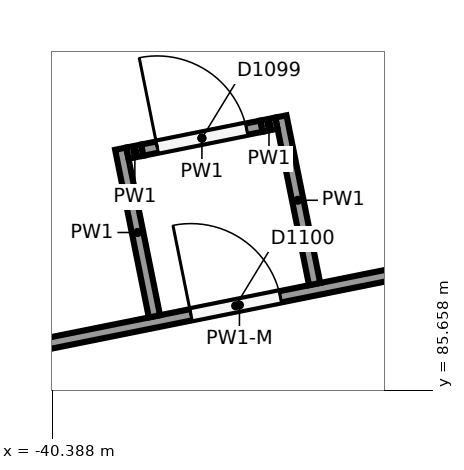
"""IFC4 building model, lengths in metres.
Left out: names, types, materials, properties, quantities, classifications, styles, units other than length and angle.
Written with IfcOpenShell. Run it as: python <this file> out.ifc"""

import sys

from ifc_helpers import new_model, si_unit, direction, frame, frame_2d, origin, place, context, subcontext, project, spatial, rectangle, extrude, element, fill, save


model = new_model("IFC4")
c1 = context("Model", 3, precision=1e-05, world=origin(), true_north=direction((0.0, 1.0)))
c2 = subcontext(c1, "Body", "Model", "MODEL_VIEW")
j1 = project(units=[si_unit("LENGTHUNIT", "METRE"), si_unit("PLANEANGLEUNIT", "RADIAN")], contexts=[c1])
p1 = place(None, origin())
s1 = spatial("IfcSite", under=j1, at=p1, CompositionType="ELEMENT")
p2 = place(p1, origin())
s2 = spatial("IfcBuilding", under=s1, at=p2, CompositionType="ELEMENT")
p3 = place(p2, frame((0.0, 0.0, 12.0)))
s3 = spatial("IfcBuildingStorey", under=s2, at=p3, CompositionType="ELEMENT", Elevation=12.0)
p4 = place(p3, frame((-42.189, 85.923, 0.0), z_axis=(0.0, 0.0, 1.0), x_axis=(0.980362096197, 0.197205883129, 0.0)))
e1 = element("IfcWall", 1, at=p4, inside=s3, PredefinedType="PARTITIONING", context=c2, shape_type="SweptSolid", body=[
    extrude(rectangle(XDim=8.702, YDim=0.15, at=frame_2d((4.351, 0.0))), origin(), (0.0, 0.0, 1.0), 3.655),
])
p5 = place(p4, frame((3.7, 0.0, 0.0)))
e2 = element("IfcOpeningElement", 2, at=p5, cuts=e1, PredefinedType="OPENING", context=c2, shape_type="SweptSolid", body=[
    extrude(rectangle(XDim=1.2, YDim=2.1, at=frame_2d((0.6, 1.05))), frame((0.0, 0.085, 0.0), z_axis=(0.0, -1.0, 0.0), x_axis=(1.0, 0.0, 0.0)), (0.0, 0.0, 1.0), 0.17),
])
for number, where, z_axis, x_axis in (
    (3, (-39.042, 86.633, 0.0), (0.0, 0.0, 1.0), (-0.197, 0.98, 0.0)),
    (4, (-36.934, 87.056, 0.0), (0.0, 0.0, 1.0), (-0.197, 0.98, 0.0)),
):
    element("IfcWall", number, at=place(p3, frame(where, z_axis=z_axis, x_axis=x_axis)), inside=s3, PredefinedType="PARTITIONING", context=c2, shape_type="SweptSolid", body=[
        extrude(rectangle(XDim=2.25, YDim=0.15, at=frame_2d((1.125, 0.0))), origin(), (0.0, 0.0, 1.0), 5.65),
    ])
p6 = place(p3, frame((-39.398, 88.78, 0.0), z_axis=(0.0, 0.0, 1.0), x_axis=(0.980250639168, 0.197759157591, 0.0)))
e5 = element("IfcWall", 5, at=p6, inside=s3, PredefinedType="PARTITIONING", context=c2, shape_type="SweptSolid", body=[
    extrude(rectangle(XDim=0.2, YDim=0.15, at=frame_2d((0.1, 0.0))), origin(), (0.0, 0.0, 1.0), 5.65),
])
p7 = place(p3, frame((-39.202, 88.819, 0.0), z_axis=(0.0, 0.0, 1.0), x_axis=(0.98037473159, 0.197143058866, 0.0)))
e6 = element("IfcWall", 6, at=p7, inside=s3, PredefinedType="PARTITIONING", context=c2, shape_type="SweptSolid", body=[
    extrude(rectangle(XDim=1.6, YDim=0.15, at=frame_2d((0.8, 0.0))), origin(), (0.0, 0.0, 1.0), 5.65),
])
p8 = place(p7, frame((0.2, 0.0, 0.0)))
e7 = element("IfcOpeningElement", 7, at=p8, cuts=e6, PredefinedType="OPENING", context=c2, shape_type="SweptSolid", body=[
    extrude(rectangle(XDim=1.2, YDim=2.1, at=frame_2d((0.6, 1.05))), frame((0.0, 0.085, 0.0), z_axis=(0.0, -1.0, 0.0), x_axis=(1.0, 0.0, 0.0)), (0.0, 0.0, 1.0), 0.17),
])
p9 = place(p3, frame((-37.633, 89.135, 0.0), z_axis=(0.0, 0.0, 1.0), x_axis=(0.980250639168, 0.197759157591, 0.0)))
e8 = element("IfcWall", 8, at=p9, inside=s3, PredefinedType="PARTITIONING", context=c2, shape_type="SweptSolid", body=[
    extrude(rectangle(XDim=0.2, YDim=0.15, at=frame_2d((0.1, 0.0))), origin(), (0.0, 0.0, 1.0), 5.65),
])
p10 = place(p5, origin())
e9 = element("IfcDoor", 9, at=p10, inside=s3, OperationType="SINGLE_SWING_LEFT", PredefinedType="DOOR", context=c2, shape_type="SweptSolid", body=[
    extrude(rectangle(XDim=1.2, YDim=2.1, at=frame_2d((0.6, 1.05))), frame((0.0, 0.025, 0.0), z_axis=(0.0, -1.0, 0.0), x_axis=(1.0, 0.0, 0.0)), (0.0, 0.0, 1.0), 0.05),
])
fill(e2, e9)
p11 = place(p8, origin())
e10 = element("IfcDoor", 10, at=p11, inside=s3, OperationType="SINGLE_SWING_LEFT", PredefinedType="DOOR", context=c2, shape_type="SweptSolid", body=[
    extrude(rectangle(XDim=1.2, YDim=2.1, at=frame_2d((0.6, 1.05))), frame((0.0, 0.025, 0.0), z_axis=(0.0, -1.0, 0.0), x_axis=(1.0, 0.0, 0.0)), (0.0, 0.0, 1.0), 0.05),
])
fill(e7, e10)
save(model, sys.argv[1])
